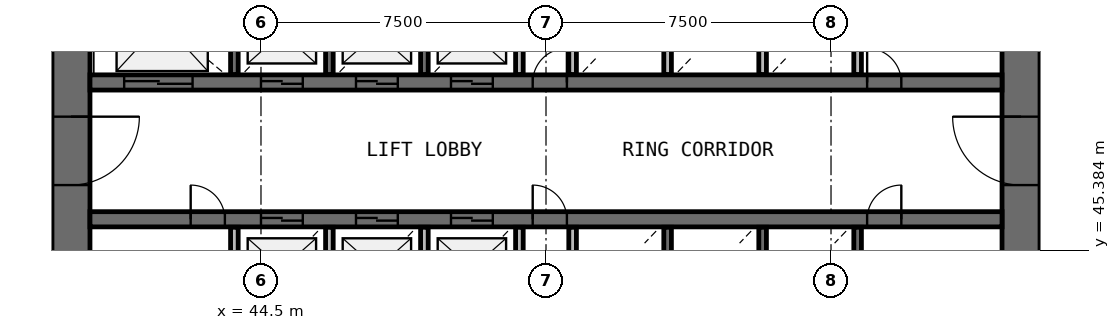
"""IFC4 building model, lengths in metres.
Left out: names, types, materials, properties, quantities, classifications, styles, units other than length and angle.
Written with IfcOpenShell. Run it as: python <this file> out.ifc"""

import sys

from ifc_helpers import new_model, si_unit, direction, frame, frame_2d, origin, place, context, subcontext, project, spatial, rectangle, extrude, source, transform, mapped, element, fill, save


model = new_model("IFC4")
c1 = context("Model", 3, precision=1e-05, world=origin(), true_north=direction((0.0, 1.0)))
c2 = subcontext(c1, "Body", "Model", "MODEL_VIEW")
j1 = project(units=[si_unit("LENGTHUNIT", "METRE"), si_unit("PLANEANGLEUNIT", "RADIAN")], contexts=[c1])
p1 = place(None, origin())
s1 = spatial("IfcSite", under=j1, at=p1, CompositionType="ELEMENT")
p2 = place(p1, origin())
s2 = spatial("IfcBuilding", under=s1, at=p2, CompositionType="ELEMENT")
p3 = place(p2, frame((0.0, 0.0, 71.0)))
s3 = spatial("IfcBuildingStorey", under=s2, at=p3, CompositionType="ELEMENT", Elevation=71.0)
p4 = place(p3, frame((64.5, 38.0, 0.0), z_axis=(0.0, 0.0, 1.0), x_axis=(0.0, 1.0, 0.0)))
e1 = element("IfcWall", 1, at=p4, inside=s3, PredefinedType="SHEAR", context=c2, shape_type="SweptSolid", body=[
    extrude(rectangle(XDim=20.0, YDim=1.0, at=frame_2d((10.0, 0.0))), origin(), (0.0, 0.0, 1.0), 4.4),
])
p5 = place(p4, frame((9.1, 0.0, 0.0)))
e2 = element("IfcOpeningElement", 2, at=p5, cuts=e1, PredefinedType="OPENING", context=c2, shape_type="SweptSolid", body=[
    extrude(rectangle(XDim=1.8, YDim=2.1, at=frame_2d((0.9, 1.05))), frame((0.0, 0.51, 0.0), z_axis=(0.0, -1.0, 0.0), x_axis=(1.0, 0.0, 0.0)), (0.0, 0.0, 1.0), 1.02),
])
p6 = place(p3, frame((39.5, 58.0, 0.0), z_axis=(0.0, 0.0, 1.0), x_axis=(0.0, -1.0, 0.0)))
e3 = element("IfcWall", 3, at=p6, inside=s3, PredefinedType="SHEAR", context=c2, shape_type="SweptSolid", body=[
    extrude(rectangle(XDim=20.0, YDim=1.0, at=frame_2d((10.0, 0.0))), origin(), (0.0, 0.0, 1.0), 4.4),
])
p7 = place(p6, frame((9.1, 0.0, 0.0)))
e4 = element("IfcOpeningElement", 4, at=p7, cuts=e3, PredefinedType="OPENING", context=c2, shape_type="SweptSolid", body=[
    extrude(rectangle(XDim=1.8, YDim=2.1, at=frame_2d((0.9, 1.05))), frame((0.0, 0.51, 0.0), z_axis=(0.0, -1.0, 0.0), x_axis=(1.0, 0.0, 0.0)), (0.0, 0.0, 1.0), 1.02),
])
p8 = place(p3, frame((40.0, 49.8, 0.0), z_axis=(0.0, 0.0, 1.0), x_axis=(1.0, 0.0, 0.0)))
e5 = element("IfcWall", 5, at=p8, inside=s3, PredefinedType="SHEAR", context=c2, shape_type="SweptSolid", body=[
    extrude(rectangle(XDim=24.0, YDim=0.4, at=frame_2d((12.0, 0.0))), origin(), (0.0, 0.0, 1.0), 4.4),
])
p9 = place(p8, frame((4.5, 0.0, 0.0)))
e6 = element("IfcOpeningElement", 6, at=p9, cuts=e5, PredefinedType="OPENING", context=c2, shape_type="SweptSolid", body=[
    extrude(rectangle(XDim=1.1, YDim=2.1, at=frame_2d((0.55, 1.05))), frame((0.0, 0.21, 0.0), z_axis=(0.0, -1.0, 0.0), x_axis=(1.0, 0.0, 0.0)), (0.0, 0.0, 1.0), 0.42),
])
p10 = place(p8, frame((7.0, 0.0, 0.0)))
e7 = element("IfcOpeningElement", 7, at=p10, cuts=e5, PredefinedType="OPENING", context=c2, shape_type="SweptSolid", body=[
    extrude(rectangle(XDim=1.1, YDim=2.1, at=frame_2d((0.55, 1.05))), frame((0.0, 0.21, 0.0), z_axis=(0.0, -1.0, 0.0), x_axis=(1.0, 0.0, 0.0)), (0.0, 0.0, 1.0), 0.42),
])
p11 = place(p8, frame((9.5, 0.0, 0.0)))
e8 = element("IfcOpeningElement", 8, at=p11, cuts=e5, PredefinedType="OPENING", context=c2, shape_type="SweptSolid", body=[
    extrude(rectangle(XDim=1.1, YDim=2.1, at=frame_2d((0.55, 1.05))), frame((0.0, 0.21, 0.0), z_axis=(0.0, -1.0, 0.0), x_axis=(1.0, 0.0, 0.0)), (0.0, 0.0, 1.0), 0.42),
])
p12 = place(p8, frame((0.9, 0.0, 0.0)))
e9 = element("IfcOpeningElement", 9, at=p12, cuts=e5, PredefinedType="OPENING", context=c2, shape_type="SweptSolid", body=[
    extrude(rectangle(XDim=1.8, YDim=2.4, at=frame_2d((0.9, 1.2))), frame((0.0, 0.21, 0.0), z_axis=(0.0, -1.0, 0.0), x_axis=(1.0, 0.0, 0.0)), (0.0, 0.0, 1.0), 0.42),
])
p13 = place(p8, frame((20.45, 0.0, 0.0)))
e10 = element("IfcOpeningElement", 10, at=p13, cuts=e5, PredefinedType="OPENING", context=c2, shape_type="SweptSolid", body=[
    extrude(rectangle(XDim=0.9, YDim=2.1, at=frame_2d((0.45, 1.05))), frame((0.0, 0.21, 0.0), z_axis=(0.0, -1.0, 0.0), x_axis=(1.0, 0.0, 0.0)), (0.0, 0.0, 1.0), 0.42),
])
p14 = place(p8, frame((11.65, 0.0, 0.0)))
e11 = element("IfcOpeningElement", 11, at=p14, cuts=e5, PredefinedType="OPENING", context=c2, shape_type="SweptSolid", body=[
    extrude(rectangle(XDim=0.9, YDim=2.1, at=frame_2d((0.45, 1.05))), frame((0.0, 0.21, 0.0), z_axis=(0.0, -1.0, 0.0), x_axis=(1.0, 0.0, 0.0)), (0.0, 0.0, 1.0), 0.42),
])
p15 = place(p3, frame((40.0, 46.2, 0.0), z_axis=(0.0, 0.0, 1.0), x_axis=(1.0, 0.0, 0.0)))
e12 = element("IfcWall", 12, at=p15, inside=s3, PredefinedType="SHEAR", context=c2, shape_type="SweptSolid", body=[
    extrude(rectangle(XDim=24.0, YDim=0.4, at=frame_2d((12.0, 0.0))), origin(), (0.0, 0.0, 1.0), 4.4),
])
p16 = place(p15, frame((4.5, 0.0, 0.0)))
e13 = element("IfcOpeningElement", 13, at=p16, cuts=e12, PredefinedType="OPENING", context=c2, shape_type="SweptSolid", body=[
    extrude(rectangle(XDim=1.1, YDim=2.1, at=frame_2d((0.55, 1.05))), frame((0.0, 0.21, 0.0), z_axis=(0.0, -1.0, 0.0), x_axis=(1.0, 0.0, 0.0)), (0.0, 0.0, 1.0), 0.42),
])
p17 = place(p15, frame((7.0, 0.0, 0.0)))
e14 = element("IfcOpeningElement", 14, at=p17, cuts=e12, PredefinedType="OPENING", context=c2, shape_type="SweptSolid", body=[
    extrude(rectangle(XDim=1.1, YDim=2.1, at=frame_2d((0.55, 1.05))), frame((0.0, 0.21, 0.0), z_axis=(0.0, -1.0, 0.0), x_axis=(1.0, 0.0, 0.0)), (0.0, 0.0, 1.0), 0.42),
])
p18 = place(p15, frame((9.5, 0.0, 0.0)))
e15 = element("IfcOpeningElement", 15, at=p18, cuts=e12, PredefinedType="OPENING", context=c2, shape_type="SweptSolid", body=[
    extrude(rectangle(XDim=1.1, YDim=2.1, at=frame_2d((0.55, 1.05))), frame((0.0, 0.21, 0.0), z_axis=(0.0, -1.0, 0.0), x_axis=(1.0, 0.0, 0.0)), (0.0, 0.0, 1.0), 0.42),
])
p19 = place(p15, frame((20.45, 0.0, 0.0)))
e16 = element("IfcOpeningElement", 16, at=p19, cuts=e12, PredefinedType="OPENING", context=c2, shape_type="SweptSolid", body=[
    extrude(rectangle(XDim=0.9, YDim=2.1, at=frame_2d((0.45, 1.05))), frame((0.0, 0.21, 0.0), z_axis=(0.0, -1.0, 0.0), x_axis=(1.0, 0.0, 0.0)), (0.0, 0.0, 1.0), 0.42),
])
p20 = place(p15, frame((2.65, 0.0, 0.0)))
e17 = element("IfcOpeningElement", 17, at=p20, cuts=e12, PredefinedType="OPENING", context=c2, shape_type="SweptSolid", body=[
    extrude(rectangle(XDim=0.9, YDim=2.1, at=frame_2d((0.45, 1.05))), frame((0.0, 0.21, 0.0), z_axis=(0.0, -1.0, 0.0), x_axis=(1.0, 0.0, 0.0)), (0.0, 0.0, 1.0), 0.42),
])
p21 = place(p15, frame((11.65, 0.0, 0.0)))
e18 = element("IfcOpeningElement", 18, at=p21, cuts=e12, PredefinedType="OPENING", context=c2, shape_type="SweptSolid", body=[
    extrude(rectangle(XDim=0.9, YDim=2.1, at=frame_2d((0.45, 1.05))), frame((0.0, 0.21, 0.0), z_axis=(0.0, -1.0, 0.0), x_axis=(1.0, 0.0, 0.0)), (0.0, 0.0, 1.0), 0.42),
])
for number, where, z_axis, x_axis in (
    (19, (43.8, 45.99, 0.0), (0.0, 0.0, 1.0), (0.0, -1.0, 0.0)),
    (20, (43.8, 52.37, 0.0), (0.0, 0.0, 1.0), (0.0, -1.0, 0.0)),
):
    element("IfcWall", number, at=place(p3, frame(where, z_axis=z_axis, x_axis=x_axis)), inside=s3, PredefinedType="SOLIDWALL", context=c2, shape_type="SweptSolid", body=[
        extrude(rectangle(XDim=2.36, YDim=0.2, at=frame_2d((1.18, 0.0))), origin(), (0.0, 0.0, 1.0), 3.9),
    ])
p22 = place(p3, frame((46.3, 43.6, 0.0), z_axis=(0.0, 0.0, 1.0), x_axis=(0.0, 1.0, 0.0)))
e21 = element("IfcWall", 21, at=p22, inside=s3, PredefinedType="SOLIDWALL", context=c2, shape_type="SweptSolid", body=[
    extrude(rectangle(XDim=2.39, YDim=0.2, at=frame_2d((1.195, 0.0))), origin(), (0.0, 0.0, 1.0), 3.9),
])
for number, where, z_axis, x_axis in (
    (22, (46.3, 50.01, 0.0), (0.0, 0.0, 1.0), (0.0, 1.0, 0.0)),
    (23, (48.8, 43.63, 0.0), (0.0, 0.0, 1.0), (0.0, 1.0, 0.0)),
    (24, (48.8, 50.01, 0.0), (0.0, 0.0, 1.0), (0.0, 1.0, 0.0)),
    (25, (51.3, 43.63, 0.0), (0.0, 0.0, 1.0), (0.0, 1.0, 0.0)),
):
    element("IfcWall", number, at=place(p3, frame(where, z_axis=z_axis, x_axis=x_axis)), inside=s3, PredefinedType="SOLIDWALL", context=c2, shape_type="SweptSolid", body=[
        extrude(rectangle(XDim=2.36, YDim=0.2, at=frame_2d((1.18, 0.0))), origin(), (0.0, 0.0, 1.0), 3.9),
    ])
for number, where, z_axis, x_axis in (
    (26, (51.3, 50.01, 0.0), (0.0, 0.0, 1.0), (0.0, 1.0, 0.0)),
    (27, (52.7, 45.99, 0.0), (0.0, 0.0, 1.0), (0.0, -1.0, 0.0)),
):
    element("IfcWall", number, at=place(p3, frame(where, z_axis=z_axis, x_axis=x_axis)), inside=s3, PredefinedType="SOLIDWALL", context=c2, shape_type="SweptSolid", body=[
        extrude(rectangle(XDim=2.39, YDim=0.2, at=frame_2d((1.195, 0.0))), origin(), (0.0, 0.0, 1.0), 3.9),
    ])
for number, where, z_axis, x_axis in (
    (28, (52.7, 52.37, 0.0), (0.0, 0.0, 1.0), (0.0, -1.0, 0.0)),
    (29, (55.2, 43.63, 0.0), (0.0, 0.0, 1.0), (0.0, 1.0, 0.0)),
    (30, (55.2, 50.01, 0.0), (0.0, 0.0, 1.0), (0.0, 1.0, 0.0)),
    (31, (57.7, 43.63, 0.0), (0.0, 0.0, 1.0), (0.0, 1.0, 0.0)),
):
    element("IfcWall", number, at=place(p3, frame(where, z_axis=z_axis, x_axis=x_axis)), inside=s3, PredefinedType="SOLIDWALL", context=c2, shape_type="SweptSolid", body=[
        extrude(rectangle(XDim=2.36, YDim=0.2, at=frame_2d((1.18, 0.0))), origin(), (0.0, 0.0, 1.0), 3.9),
    ])
p23 = place(p3, frame((57.7, 50.01, 0.0), z_axis=(0.0, 0.0, 1.0), x_axis=(0.0, 1.0, 0.0)))
e32 = element("IfcWall", 32, at=p23, inside=s3, PredefinedType="SOLIDWALL", context=c2, shape_type="SweptSolid", body=[
    extrude(rectangle(XDim=2.39, YDim=0.2, at=frame_2d((1.195, 0.0))), origin(), (0.0, 0.0, 1.0), 3.9),
])
for number, where, z_axis, x_axis in (
    (33, (60.2, 43.63, 0.0), (0.0, 0.0, 1.0), (0.0, 1.0, 0.0)),
    (34, (60.2, 50.01, 0.0), (0.0, 0.0, 1.0), (0.0, 1.0, 0.0)),
):
    element("IfcWall", number, at=place(p3, frame(where, z_axis=z_axis, x_axis=x_axis)), inside=s3, PredefinedType="SOLIDWALL", context=c2, shape_type="SweptSolid", body=[
        extrude(rectangle(XDim=2.36, YDim=0.2, at=frame_2d((1.18, 0.0))), origin(), (0.0, 0.0, 1.0), 3.9),
    ])
m1 = source(origin(), c2, "Body", "SweptSolid", [
    extrude(rectangle(XDim=1.8, YDim=2.1, at=frame_2d((0.9, 1.05))), frame((0.0, 0.025, 0.0), z_axis=(0.0, -1.0, 0.0), x_axis=(1.0, 0.0, 0.0)), (0.0, 0.0, 1.0), 0.05),
])
p24 = place(p7, origin())
e35 = element("IfcDoor", 35, at=p24, inside=s3, OperationType="SINGLE_SWING_LEFT", PredefinedType="DOOR", context=c2, shape_type="MappedRepresentation", body=[
    mapped(m1, transform((0.0, 0.0, 0.0), scale=1.0)),
])
fill(e4, e35)
p25 = place(p5, origin())
e36 = element("IfcDoor", 36, at=p25, inside=s3, OperationType="SINGLE_SWING_RIGHT", PredefinedType="DOOR", context=c2, shape_type="MappedRepresentation", body=[
    mapped(m1, transform((0.0, 0.0, 0.0), scale=1.0)),
])
fill(e2, e36)
m2 = source(origin(), c2, "Body", "SweptSolid", [
    extrude(rectangle(XDim=1.1, YDim=2.1, at=frame_2d((0.55, 1.05))), frame((0.0, 0.025, 0.0), z_axis=(0.0, -1.0, 0.0), x_axis=(1.0, 0.0, 0.0)), (0.0, 0.0, 1.0), 0.05),
])
p26 = place(p9, origin())
e37 = element("IfcDoor", 37, at=p26, inside=s3, OperationType="DOUBLE_DOOR_SLIDING", PredefinedType="USERDEFINED", context=c2, shape_type="MappedRepresentation", body=[
    mapped(m2, transform((0.0, 0.0, 0.0), scale=1.0)),
])
fill(e6, e37)
p27 = place(p10, origin())
e38 = element("IfcDoor", 38, at=p27, inside=s3, OperationType="DOUBLE_DOOR_SLIDING", PredefinedType="USERDEFINED", context=c2, shape_type="MappedRepresentation", body=[
    mapped(m2, transform((0.0, 0.0, 0.0), scale=1.0)),
])
fill(e7, e38)
p28 = place(p11, origin())
e39 = element("IfcDoor", 39, at=p28, inside=s3, OperationType="DOUBLE_DOOR_SLIDING", PredefinedType="USERDEFINED", context=c2, shape_type="MappedRepresentation", body=[
    mapped(m2, transform((0.0, 0.0, 0.0), scale=1.0)),
])
fill(e8, e39)
p29 = place(p16, origin())
e40 = element("IfcDoor", 40, at=p29, inside=s3, OperationType="DOUBLE_DOOR_SLIDING", PredefinedType="USERDEFINED", context=c2, shape_type="MappedRepresentation", body=[
    mapped(m2, transform((0.0, 0.0, 0.0), scale=1.0)),
])
fill(e13, e40)
p30 = place(p17, origin())
e41 = element("IfcDoor", 41, at=p30, inside=s3, OperationType="DOUBLE_DOOR_SLIDING", PredefinedType="USERDEFINED", context=c2, shape_type="MappedRepresentation", body=[
    mapped(m2, transform((0.0, 0.0, 0.0), scale=1.0)),
])
fill(e14, e41)
p31 = place(p18, origin())
e42 = element("IfcDoor", 42, at=p31, inside=s3, OperationType="DOUBLE_DOOR_SLIDING", PredefinedType="USERDEFINED", context=c2, shape_type="MappedRepresentation", body=[
    mapped(m2, transform((0.0, 0.0, 0.0), scale=1.0)),
])
fill(e15, e42)
m3 = source(origin(), c2, "Body", "SweptSolid", [
    extrude(rectangle(XDim=1.8, YDim=2.4, at=frame_2d((0.9, 1.2))), frame((0.0, 0.025, 0.0), z_axis=(0.0, -1.0, 0.0), x_axis=(1.0, 0.0, 0.0)), (0.0, 0.0, 1.0), 0.05),
])
p32 = place(p12, origin())
e43 = element("IfcDoor", 43, at=p32, inside=s3, OperationType="DOUBLE_DOOR_SLIDING", PredefinedType="USERDEFINED", context=c2, shape_type="MappedRepresentation", body=[
    mapped(m3, transform((0.0, 0.0, 0.0), scale=1.0)),
])
fill(e9, e43)
m4 = source(origin(), c2, "Body", "SweptSolid", [
    extrude(rectangle(XDim=0.9, YDim=2.1, at=frame_2d((0.45, 1.05))), frame((0.0, 0.025, 0.0), z_axis=(0.0, -1.0, 0.0), x_axis=(1.0, 0.0, 0.0)), (0.0, 0.0, 1.0), 0.05),
])
p33 = place(p19, origin())
e44 = element("IfcDoor", 44, at=p33, inside=s3, OperationType="SINGLE_SWING_RIGHT", PredefinedType="DOOR", context=c2, shape_type="MappedRepresentation", body=[
    mapped(m4, transform((0.0, 0.0, 0.0), scale=1.0)),
])
fill(e16, e44)
p34 = place(p13, origin())
e45 = element("IfcDoor", 45, at=p34, inside=s3, OperationType="SINGLE_SWING_LEFT", PredefinedType="DOOR", context=c2, shape_type="MappedRepresentation", body=[
    mapped(m4, transform((0.0, 0.0, 0.0), scale=1.0)),
])
fill(e10, e45)
p35 = place(p20, origin())
e46 = element("IfcDoor", 46, at=p35, inside=s3, OperationType="SINGLE_SWING_LEFT", PredefinedType="DOOR", context=c2, shape_type="MappedRepresentation", body=[
    mapped(m4, transform((0.0, 0.0, 0.0), scale=1.0)),
])
fill(e17, e46)
p36 = place(p14, origin())
e47 = element("IfcDoor", 47, at=p36, inside=s3, OperationType="SINGLE_SWING_RIGHT", PredefinedType="DOOR", context=c2, shape_type="MappedRepresentation", body=[
    mapped(m4, transform((0.0, 0.0, 0.0), scale=1.0)),
])
fill(e11, e47)
p37 = place(p21, origin())
e48 = element("IfcDoor", 48, at=p37, inside=s3, OperationType="SINGLE_SWING_LEFT", PredefinedType="DOOR", context=c2, shape_type="MappedRepresentation", body=[
    mapped(m4, transform((0.0, 0.0, 0.0), scale=1.0)),
])
fill(e18, e48)
save(model, sys.argv[1])
